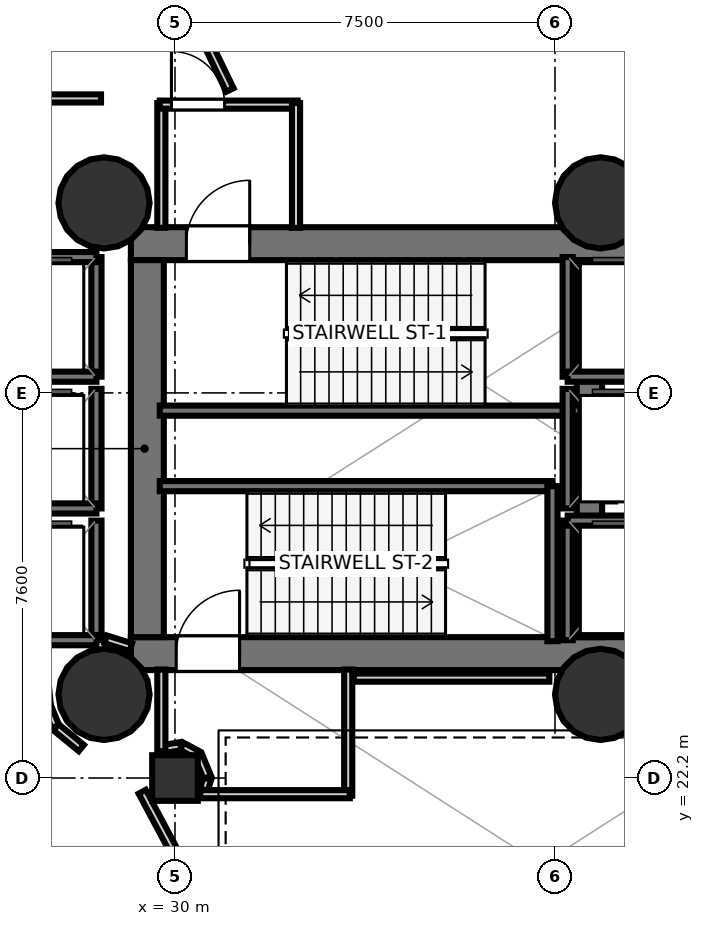
"""IFC4 building model, lengths in metres.
Left out: names, types, materials, properties, quantities, classifications, styles, units other than length and angle.
Written with IfcOpenShell. Run it as: python <this file> out.ifc"""

import sys

from ifc_helpers import new_model, si_unit, direction, frame, frame_2d, origin, origin_2d, place, context, subcontext, project, spatial, rectangle, hollow_circle, extrude, element, fill, save


model = new_model("IFC4")
c1 = context("Model", 3, precision=1e-05, world=origin(), true_north=direction((0.0, 1.0)))
c2 = subcontext(c1, "Body", "Model", "MODEL_VIEW")
j1 = project(units=[si_unit("LENGTHUNIT", "METRE"), si_unit("PLANEANGLEUNIT", "RADIAN")], contexts=[c1])
p1 = place(None, origin())
s1 = spatial("IfcSite", under=j1, at=p1, CompositionType="ELEMENT")
p2 = place(p1, origin())
s2 = spatial("IfcBuilding", under=s1, at=p2, CompositionType="ELEMENT")
p3 = place(p2, frame((0.0, 0.0, 20.6)))
s3 = spatial("IfcBuildingStorey", under=s2, at=p3, CompositionType="ELEMENT", Elevation=20.6)
p4 = place(p3, frame((29.13, 32.745, 0.0), z_axis=(0.0, 0.0, 1.0), x_axis=(1.0, 0.0, 0.0)))
e1 = element("IfcWall", 1, at=p4, inside=s3, PredefinedType="SHEAR", context=c2, shape_type="SweptSolid", body=[
    extrude(rectangle(XDim=10.72, YDim=0.65, at=frame_2d((5.36, 0.0))), origin(), (0.0, 0.0, 1.0), 4.88),
])
p5 = place(p4, frame((1.095, 0.0, 0.0)))
e2 = element("IfcOpeningElement", 2, at=p5, cuts=e1, PredefinedType="OPENING", context=c2, shape_type="SweptSolid", body=[
    extrude(rectangle(XDim=1.25, YDim=2.15, at=frame_2d((0.625, 1.075))), frame((0.0, 0.335, 0.0), z_axis=(0.0, -1.0, 0.0), x_axis=(1.0, 0.0, 0.0)), (0.0, 0.0, 1.0), 0.67),
])
p6 = place(p3, frame((29.13, 24.655, 0.0), z_axis=(0.0, 0.0, 1.0), x_axis=(1.0, 0.0, 0.0)))
e3 = element("IfcWall", 3, at=p6, inside=s3, PredefinedType="SHEAR", context=c2, shape_type="SweptSolid", body=[
    extrude(rectangle(XDim=10.72, YDim=0.65, at=frame_2d((5.36, 0.0))), origin(), (0.0, 0.0, 1.0), 4.88),
])
p7 = place(p6, frame((0.895, 0.0, 0.0)))
e4 = element("IfcOpeningElement", 4, at=p7, cuts=e3, PredefinedType="OPENING", context=c2, shape_type="SweptSolid", body=[
    extrude(rectangle(XDim=1.25, YDim=2.15, at=frame_2d((0.625, 1.075))), frame((0.0, 0.335, 0.0), z_axis=(0.0, -1.0, 0.0), x_axis=(1.0, 0.0, 0.0)), (0.0, 0.0, 1.0), 0.67),
])
p8 = place(p3, frame((29.455, 24.98, 0.0), z_axis=(0.0, 0.0, 1.0), x_axis=(0.0, 1.0, 0.0)))
e5 = element("IfcWall", 5, at=p8, inside=s3, PredefinedType="SHEAR", context=c2, shape_type="SweptSolid", body=[
    extrude(rectangle(XDim=7.44, YDim=0.65, at=frame_2d((3.72, 0.0))), origin(), (0.0, 0.0, 1.0), 4.88),
])
p9 = place(p3, frame((38.18, 24.98, 0.0), z_axis=(0.0, 0.0, 1.0), x_axis=(0.0, 1.0, 0.0)))
e6 = element("IfcWall", 6, at=p9, inside=s3, PredefinedType="SHEAR", context=c2, shape_type="SweptSolid", body=[
    extrude(rectangle(XDim=7.44, YDim=0.5, at=frame_2d((3.72, 0.0))), origin(), (0.0, 0.0, 1.0), 4.88),
])
for number, where, z_axis, x_axis in (
    (7, (28.6, 33.55, 0.0), (0.0, 0.0, 1.0), (1.0, 0.0, 0.0)),
    (8, (28.6, 23.85, 0.0), (0.0, 0.0, 1.0), (1.0, 0.0, 0.0)),
    (9, (38.4, 33.55, 0.0), (0.0, 0.0, 1.0), (1.0, 0.0, 0.0)),
    (10, (38.4, 23.85, 0.0), (0.0, 0.0, 1.0), (1.0, 0.0, 0.0)),
):
    element("IfcColumn", number, at=place(p3, frame(where, z_axis=z_axis, x_axis=x_axis)), inside=s3, PredefinedType="COLUMN", context=c2, shape_type="SweptSolid", body=[
        extrude(hollow_circle(Radius=0.9, WallThickness=0.045, at=origin_2d()), origin(), (0.0, 0.0, 1.0), 5.1),
    ])
p10 = place(p3, frame((30.0, 22.2, 0.0), z_axis=(0.0, 0.0, 1.0), x_axis=(1.0, 0.0, 0.0)))
e11 = element("IfcColumn", 11, at=p10, inside=s3, PredefinedType="COLUMN", context=c2, shape_type="SweptSolid", body=[
    extrude(rectangle(XDim=0.9, YDim=0.9, at=origin_2d()), origin(), (0.0, 0.0, 1.0), 5.1),
])
p11 = place(p3, frame((29.7, 29.45, 0.0), z_axis=(0.0, 0.0, 1.0), x_axis=(1.0, 0.0, 0.0)))
e12 = element("IfcWall", 12, at=p11, inside=s3, PredefinedType="SOLIDWALL", context=c2, shape_type="SweptSolid", body=[
    extrude(rectangle(XDim=8.3, YDim=0.2, at=frame_2d((4.15, 0.0))), origin(), (0.0, 0.0, 1.0), 4.88),
])
p12 = place(p3, frame((29.7, 27.96, 0.0), z_axis=(0.0, 0.0, 1.0), x_axis=(1.0, 0.0, 0.0)))
e13 = element("IfcWall", 13, at=p12, inside=s3, PredefinedType="SOLIDWALL", context=c2, shape_type="SweptSolid", body=[
    extrude(rectangle(XDim=7.75, YDim=0.2, at=frame_2d((3.875, 0.0))), origin(), (0.0, 0.0, 1.0), 4.88),
])
p13 = place(p3, frame((37.45, 24.9, 0.0), z_axis=(0.0, 0.0, 1.0), x_axis=(0.0, 1.0, 0.0)))
e14 = element("IfcWall", 14, at=p13, inside=s3, PredefinedType="SOLIDWALL", context=c2, shape_type="SweptSolid", body=[
    extrude(rectangle(XDim=3.06, YDim=0.2, at=frame_2d((1.53, 0.0))), origin(), (0.0, 0.0, 1.0), 4.88),
])
p14 = place(p3, frame((37.75, 30.12, 0.0), z_axis=(0.0, 0.0, 1.0), x_axis=(0.0, 1.0, 0.0)))
e15 = element("IfcWall", 15, at=p14, inside=s3, PredefinedType="SOLIDWALL", context=c2, shape_type="SweptSolid", body=[
    extrude(rectangle(XDim=2.36, YDim=0.2, at=frame_2d((1.18, 0.0))), origin(), (0.0, 0.0, 1.0), 4.88),
])
p15 = place(p3, frame((37.75, 30.12, 0.0), z_axis=(0.0, 0.0, 1.0), x_axis=(1.0, 0.0, 0.0)))
e16 = element("IfcWall", 16, at=p15, inside=s3, PredefinedType="SOLIDWALL", context=c2, shape_type="SweptSolid", body=[
    extrude(rectangle(XDim=2.1, YDim=0.2, at=frame_2d((1.05, 0.0))), origin(), (0.0, 0.0, 1.0), 4.88),
])
p16 = place(p3, frame((37.75, 24.92, 0.0), z_axis=(0.0, 0.0, 1.0), x_axis=(0.0, 1.0, 0.0)))
e17 = element("IfcWall", 17, at=p16, inside=s3, PredefinedType="SOLIDWALL", context=c2, shape_type="SweptSolid", body=[
    extrude(rectangle(XDim=2.36, YDim=0.2, at=frame_2d((1.18, 0.0))), origin(), (0.0, 0.0, 1.0), 4.88),
])
p17 = place(p3, frame((37.75, 27.28, 0.0), z_axis=(0.0, 0.0, 1.0), x_axis=(1.0, 0.0, 0.0)))
e18 = element("IfcWall", 18, at=p17, inside=s3, PredefinedType="SOLIDWALL", context=c2, shape_type="SweptSolid", body=[
    extrude(rectangle(XDim=2.1, YDim=0.2, at=frame_2d((1.05, 0.0))), origin(), (0.0, 0.0, 1.0), 4.88),
])
p18 = place(p3, frame((28.45, 30.12, 0.0), z_axis=(0.0, 0.0, 1.0), x_axis=(0.0, 1.0, 0.0)))
e19 = element("IfcWall", 19, at=p18, inside=s3, PredefinedType="SOLIDWALL", context=c2, shape_type="SweptSolid", body=[
    extrude(rectangle(XDim=2.36, YDim=0.2, at=frame_2d((1.18, 0.0))), origin(), (0.0, 0.0, 1.0), 4.88),
])
for number, where, z_axis, x_axis in (
    (20, (26.35, 32.48, 0.0), (0.0, 0.0, 1.0), (1.0, 0.0, 0.0)),
    (21, (26.35, 30.12, 0.0), (0.0, 0.0, 1.0), (1.0, 0.0, 0.0)),
):
    element("IfcWall", number, at=place(p3, frame(where, z_axis=z_axis, x_axis=x_axis)), inside=s3, PredefinedType="SOLIDWALL", context=c2, shape_type="SweptSolid", body=[
        extrude(rectangle(XDim=2.1, YDim=0.2, at=frame_2d((1.05, 0.0))), origin(), (0.0, 0.0, 1.0), 4.88),
    ])
p19 = place(p3, frame((28.45, 27.52, 0.0), z_axis=(0.0, 0.0, 1.0), x_axis=(0.0, 1.0, 0.0)))
e22 = element("IfcWall", 22, at=p19, inside=s3, PredefinedType="SOLIDWALL", context=c2, shape_type="SweptSolid", body=[
    extrude(rectangle(XDim=2.36, YDim=0.2, at=frame_2d((1.18, 0.0))), origin(), (0.0, 0.0, 1.0), 4.88),
])
p20 = place(p3, frame((26.35, 27.52, 0.0), z_axis=(0.0, 0.0, 1.0), x_axis=(1.0, 0.0, 0.0)))
e23 = element("IfcWall", 23, at=p20, inside=s3, PredefinedType="SOLIDWALL", context=c2, shape_type="SweptSolid", body=[
    extrude(rectangle(XDim=2.1, YDim=0.2, at=frame_2d((1.05, 0.0))), origin(), (0.0, 0.0, 1.0), 4.88),
])
p21 = place(p3, frame((28.45, 24.92, 0.0), z_axis=(0.0, 0.0, 1.0), x_axis=(0.0, 1.0, 0.0)))
e24 = element("IfcWall", 24, at=p21, inside=s3, PredefinedType="SOLIDWALL", context=c2, shape_type="SweptSolid", body=[
    extrude(rectangle(XDim=2.36, YDim=0.2, at=frame_2d((1.18, 0.0))), origin(), (0.0, 0.0, 1.0), 4.88),
])
p22 = place(p3, frame((26.35, 24.92, 0.0), z_axis=(0.0, 0.0, 1.0), x_axis=(1.0, 0.0, 0.0)))
e25 = element("IfcWall", 25, at=p22, inside=s3, PredefinedType="SOLIDWALL", context=c2, shape_type="SweptSolid", body=[
    extrude(rectangle(XDim=2.1, YDim=0.2, at=frame_2d((1.05, 0.0))), origin(), (0.0, 0.0, 1.0), 4.88),
])
p23 = place(p3, frame((37.75, 27.52, 0.0), z_axis=(0.0, 0.0, 1.0), x_axis=(0.0, 1.0, 0.0)))
e26 = element("IfcWall", 26, at=p23, inside=s3, PredefinedType="SOLIDWALL", context=c2, shape_type="SweptSolid", body=[
    extrude(rectangle(XDim=2.36, YDim=0.2, at=frame_2d((1.18, 0.0))), origin(), (0.0, 0.0, 1.0), 4.88),
])
p24 = place(p3, frame((29.731, 33.058, 0.0), z_axis=(0.0, 0.0, 1.0), x_axis=(0.0, 1.0, 0.0)))
e27 = element("IfcWall", 27, at=p24, inside=s3, PredefinedType="PARTITIONING", context=c2, shape_type="SweptSolid", body=[
    extrude(rectangle(XDim=2.462, YDim=0.16, at=frame_2d((1.231, 0.0))), origin(), (0.0, 0.0, 1.0), 3.378),
])
p25 = place(p3, frame((29.7, 35.489, 0.0), z_axis=(0.0, 0.0, 1.0), x_axis=(1.0, 0.0, 0.0)))
e28 = element("IfcWall", 28, at=p25, inside=s3, PredefinedType="PARTITIONING", context=c2, shape_type="SweptSolid", body=[
    extrude(rectangle(XDim=2.72, YDim=0.16, at=frame_2d((1.36, 0.0))), origin(), (0.0, 0.0, 1.0), 3.4),
])
p26 = place(p25, frame((0.23, 0.0, 0.0)))
e29 = element("IfcOpeningElement", 29, at=p26, cuts=e28, PredefinedType="OPENING", context=c2, shape_type="SweptSolid", body=[
    extrude(rectangle(XDim=1.05, YDim=2.15, at=frame_2d((0.525, 1.075))), frame((0.0, 0.09, 0.0), z_axis=(0.0, -1.0, 0.0), x_axis=(1.0, 0.0, 0.0)), (0.0, 0.0, 1.0), 0.18),
])
p27 = place(p3, frame((32.389, 35.52, 0.0), z_axis=(0.0, 0.0, 1.0), x_axis=(0.0, -1.0, 0.0)))
e30 = element("IfcWall", 30, at=p27, inside=s3, PredefinedType="PARTITIONING", context=c2, shape_type="SweptSolid", body=[
    extrude(rectangle(XDim=2.462, YDim=0.16, at=frame_2d((1.231, 0.0))), origin(), (0.0, 0.0, 1.0), 3.378),
])
p28 = place(p3, frame((30.569, 21.97, 0.0), z_axis=(0.0, 0.0, 1.0), x_axis=(0.304162531931, 0.952620152091, 0.0)))
e31 = element("IfcWall", 31, at=p28, inside=s3, PredefinedType="PARTITIONING", context=c2, shape_type="SweptSolid", body=[
    extrude(rectangle(XDim=0.231, YDim=0.16, at=frame_2d((0.116, 0.0))), origin(), (0.0, 0.0, 1.0), 3.4),
])
p29 = place(p3, frame((30.639, 22.212, 0.0), z_axis=(0.0, 0.0, 1.0), x_axis=(-0.382721202621, 0.923863886655, 0.0)))
e32 = element("IfcWall", 32, at=p29, inside=s3, PredefinedType="PARTITIONING", context=c2, shape_type="SweptSolid", body=[
    extrude(rectangle(XDim=0.467, YDim=0.16, at=frame_2d((0.233, 0.0))), origin(), (0.0, 0.0, 1.0), 3.4),
])
p30 = place(p3, frame((30.446, 22.659, 0.0), z_axis=(0.0, 0.0, 1.0), x_axis=(-0.881817981942, 0.471589913721, 0.0)))
e33 = element("IfcWall", 33, at=p30, inside=s3, PredefinedType="PARTITIONING", context=c2, shape_type="SweptSolid", body=[
    extrude(rectangle(XDim=0.354, YDim=0.16, at=frame_2d((0.177, 0.0))), origin(), (0.0, 0.0, 1.0), 3.4),
])
p31 = place(p3, frame((30.114, 22.829, 0.0), z_axis=(0.0, 0.0, 1.0), x_axis=(-0.986222627979, -0.165423480989, 0.0)))
e34 = element("IfcWall", 34, at=p31, inside=s3, PredefinedType="PARTITIONING", context=c2, shape_type="SweptSolid", body=[
    extrude(rectangle(XDim=0.425, YDim=0.16, at=frame_2d((0.212, 0.0))), origin(), (0.0, 0.0, 1.0), 3.4),
])
p32 = place(p3, frame((29.731, 22.728, 0.0), z_axis=(0.0, 0.0, 1.0), x_axis=(0.0, 1.0, 0.0)))
e35 = element("IfcWall", 35, at=p32, inside=s3, PredefinedType="PARTITIONING", context=c2, shape_type="SweptSolid", body=[
    extrude(rectangle(XDim=1.614, YDim=0.16, at=frame_2d((0.807, 0.0))), origin(), (0.0, 0.0, 1.0), 3.378),
])
p33 = place(p3, frame((33.419, 24.342, 0.0), z_axis=(0.0, 0.0, 1.0), x_axis=(0.0, -1.0, 0.0)))
e36 = element("IfcWall", 36, at=p33, inside=s3, PredefinedType="PARTITIONING", context=c2, shape_type="SweptSolid", body=[
    extrude(rectangle(XDim=2.492, YDim=0.16, at=frame_2d((1.246, 0.0))), origin(), (0.0, 0.0, 1.0), 3.378),
])
p34 = place(p3, frame((33.45, 21.881, 0.0), z_axis=(0.0, 0.0, 1.0), x_axis=(-1.0, 0.0, 0.0)))
e37 = element("IfcWall", 37, at=p34, inside=s3, PredefinedType="PARTITIONING", context=c2, shape_type="SweptSolid", body=[
    extrude(rectangle(XDim=2.952, YDim=0.16, at=frame_2d((1.476, 0.0))), origin(), (0.0, 0.0, 1.0), 3.4),
])
p35 = place(p3, frame((29.13, 24.782, 0.0), z_axis=(0.0, 0.0, 1.0), x_axis=(-0.955000482512, 0.296604245422, 0.0)))
e38 = element("IfcWall", 38, at=p35, inside=s3, PredefinedType="PARTITIONING", context=c2, shape_type="SweptSolid", body=[
    extrude(rectangle(XDim=0.524, YDim=0.16, at=frame_2d((0.262, 0.0))), origin(), (0.0, 0.0, 1.0), 3.4),
])
p36 = place(p3, frame((37.389, 24.181, 0.0), z_axis=(0.0, 0.0, 1.0), x_axis=(-1.0, 0.0, 0.0)))
e39 = element("IfcWall", 39, at=p36, inside=s3, PredefinedType="PARTITIONING", context=c2, shape_type="SweptSolid", body=[
    extrude(rectangle(XDim=3.859, YDim=0.16, at=frame_2d((1.929, 0.0))), origin(), (0.0, 0.0, 1.0), 3.378),
])
p37 = place(p3, frame((30.258, 37.487, 0.0), z_axis=(0.0, 0.0, 1.0), x_axis=(0.435698821732, -0.900092515657, 0.0)))
e40 = element("IfcWall", 40, at=p37, inside=s3, PredefinedType="PARTITIONING", context=c2, shape_type="SweptSolid", body=[
    extrude(rectangle(XDim=1.897, YDim=0.16, at=frame_2d((0.949, 0.0))), origin(), (0.0, 0.0, 1.0), 3.4),
])
p38 = place(p3, frame((28.54, 35.611, 0.0), z_axis=(0.0, 0.0, 1.0), x_axis=(-1.0, 0.0, 0.0)))
e41 = element("IfcWall", 41, at=p38, inside=s3, PredefinedType="PARTITIONING", context=c2, shape_type="SweptSolid", body=[
    extrude(rectangle(XDim=1.69, YDim=0.16, at=frame_2d((0.845, 0.0))), origin(), (0.0, 0.0, 1.0), 3.378),
])
p39 = place(p3, frame((27.473, 23.62, 0.0), z_axis=(0.0, 0.0, 1.0), x_axis=(0.382631351728, -0.923901103298, 0.0)))
e42 = element("IfcWall", 42, at=p39, inside=s3, PredefinedType="PARTITIONING", context=c2, shape_type="SweptSolid", body=[
    extrude(rectangle(XDim=0.437, YDim=0.16, at=frame_2d((0.219, 0.0))), origin(), (0.0, 0.0, 1.0), 3.378),
])
p40 = place(p3, frame((27.649, 23.204, 0.0), z_axis=(0.0, 0.0, 1.0), x_axis=(0.772818338666, -0.634627304346, 0.0)))
e43 = element("IfcWall", 43, at=p40, inside=s3, PredefinedType="PARTITIONING", context=c2, shape_type="SweptSolid", body=[
    extrude(rectangle(XDim=0.65, YDim=0.16, at=frame_2d((0.325, 0.0))), origin(), (0.0, 0.0, 1.0), 3.378),
])
p41 = place(p3, frame((29.354, 21.929, 0.0), z_axis=(0.0, 0.0, 1.0), x_axis=(0.471375681313, -0.881932518432, 0.0)))
e44 = element("IfcWall", 44, at=p41, inside=s3, PredefinedType="PARTITIONING", context=c2, shape_type="SweptSolid", body=[
    extrude(rectangle(XDim=2.059, YDim=0.16, at=frame_2d((1.03, 0.0))), origin(), (0.0, 0.0, 1.0), 3.4),
])
p42 = place(p3, frame((27.919, 20.397, 0.0), z_axis=(0.0, 0.0, 1.0), x_axis=(-0.932053116436, 0.362321663915, 0.0)))
e45 = element("IfcWall", 45, at=p42, inside=s3, PredefinedType="PARTITIONING", context=c2, shape_type="SweptSolid", body=[
    extrude(rectangle(XDim=1.135, YDim=0.16, at=frame_2d((0.567, 0.0))), origin(), (0.0, 0.0, 1.0), 3.4),
])
p43 = place(p5, origin())
e46 = element("IfcDoor", 46, at=p43, inside=s3, OperationType="SINGLE_SWING_RIGHT", PredefinedType="DOOR", context=c2, shape_type="SweptSolid", body=[
    extrude(rectangle(XDim=1.25, YDim=2.15, at=frame_2d((0.625, 1.075))), frame((0.0, 0.025, 0.0), z_axis=(0.0, -1.0, 0.0), x_axis=(1.0, 0.0, 0.0)), (0.0, 0.0, 1.0), 0.05),
])
fill(e2, e46)
p44 = place(p7, origin())
e47 = element("IfcDoor", 47, at=p44, inside=s3, OperationType="SINGLE_SWING_RIGHT", PredefinedType="DOOR", context=c2, shape_type="SweptSolid", body=[
    extrude(rectangle(XDim=1.25, YDim=2.15, at=frame_2d((0.625, 1.075))), frame((0.0, 0.025, 0.0), z_axis=(0.0, -1.0, 0.0), x_axis=(1.0, 0.0, 0.0)), (0.0, 0.0, 1.0), 0.05),
])
fill(e4, e47)
p45 = place(p26, origin())
e48 = element("IfcDoor", 48, at=p45, inside=s3, OperationType="SINGLE_SWING_LEFT", PredefinedType="DOOR", context=c2, shape_type="SweptSolid", body=[
    extrude(rectangle(XDim=1.05, YDim=2.15, at=frame_2d((0.525, 1.075))), frame((0.0, 0.025, 0.0), z_axis=(0.0, -1.0, 0.0), x_axis=(1.0, 0.0, 0.0)), (0.0, 0.0, 1.0), 0.05),
])
fill(e29, e48)
save(model, sys.argv[1])
